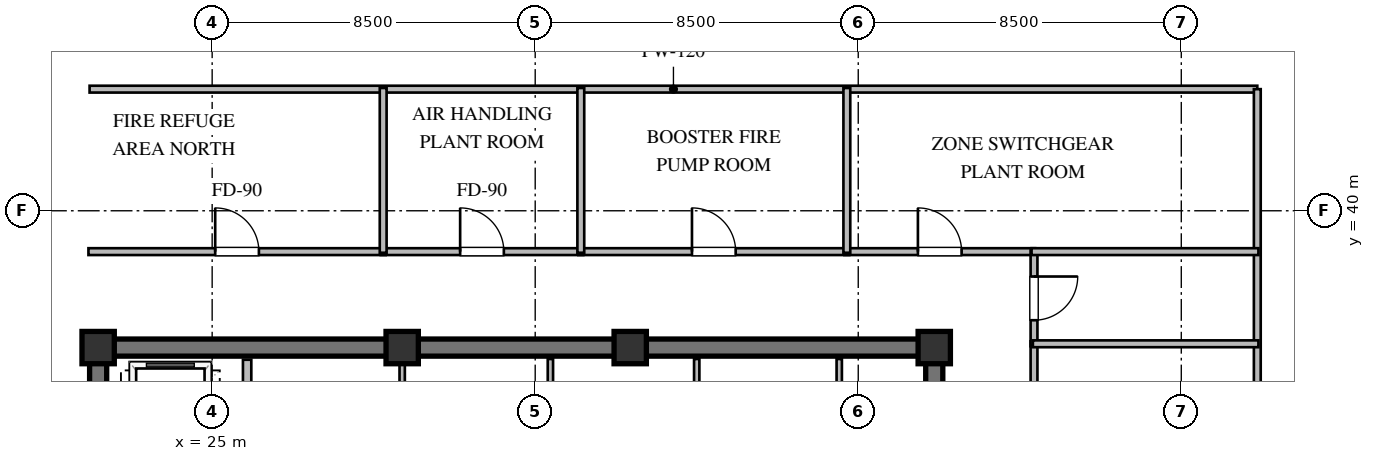
"""IFC4 building model, lengths in metres.
Left out: names, types, materials, properties, quantities, classifications, styles, units other than length and angle.
Written with IfcOpenShell. Run it as: python <this file> out.ifc"""

import sys

from ifc_helpers import new_model, si_unit, direction, frame, frame_2d, origin, origin_2d, place, context, subcontext, project, spatial, rectangle, extrude, element, fill, save


model = new_model("IFC4")
c1 = context("Model", 3, precision=1e-05, world=origin(), true_north=direction((0.0, 1.0)))
c2 = subcontext(c1, "Body", "Model", "MODEL_VIEW")
j1 = project(units=[si_unit("LENGTHUNIT", "METRE"), si_unit("PLANEANGLEUNIT", "RADIAN")], contexts=[c1])
p1 = place(None, origin())
s1 = spatial("IfcSite", under=j1, at=p1, CompositionType="ELEMENT")
p2 = place(p1, origin())
s2 = spatial("IfcBuilding", under=s1, at=p2, CompositionType="ELEMENT")
p3 = place(p2, frame((0.0, 0.0, 253.2)))
s3 = spatial("IfcBuildingStorey", under=s2, at=p3, CompositionType="ELEMENT", Elevation=253.2)
p4 = place(p3, frame((21.775, 36.4, 0.0), z_axis=(0.0, 0.0, 1.0), x_axis=(1.0, 0.0, 0.0)))
e1 = element("IfcWall", 1, at=p4, inside=s3, PredefinedType="SHEAR", context=c2, shape_type="SweptSolid", body=[
    extrude(rectangle(XDim=22.45, YDim=0.45, at=frame_2d((11.225, 0.0))), origin(), (0.0, 0.0, 1.0), 5.16),
])
p5 = place(p3, frame((22.0, 23.825, 0.0), z_axis=(0.0, 0.0, 1.0), x_axis=(0.0, 1.0, 0.0)))
e2 = element("IfcWall", 2, at=p5, inside=s3, PredefinedType="SHEAR", context=c2, shape_type="SweptSolid", body=[
    extrude(rectangle(XDim=12.35, YDim=0.45, at=frame_2d((6.175, 0.0))), origin(), (0.0, 0.0, 1.0), 5.16),
])
p6 = place(p3, frame((44.0, 23.825, 0.0), z_axis=(0.0, 0.0, 1.0), x_axis=(0.0, 1.0, 0.0)))
e3 = element("IfcWall", 3, at=p6, inside=s3, PredefinedType="SHEAR", context=c2, shape_type="SweptSolid", body=[
    extrude(rectangle(XDim=12.35, YDim=0.45, at=frame_2d((6.175, 0.0))), origin(), (0.0, 0.0, 1.0), 5.16),
])
p7 = place(p6, frame((8.675, 0.0, 0.0)))
e4 = element("IfcOpeningElement", 4, at=p7, cuts=e3, PredefinedType="OPENING", context=c2, shape_type="SweptSolid", body=[
    extrude(rectangle(XDim=1.5, YDim=2.15, at=frame_2d((0.75, 1.075))), frame((0.0, 0.235, 0.0), z_axis=(0.0, -1.0, 0.0), x_axis=(1.0, 0.0, 0.0)), (0.0, 0.0, 1.0), 0.47),
])
for number, where, z_axis, x_axis in (
    (5, (44.0, 36.4, 0.0), (0.0, 0.0, 1.0), (1.0, 0.0, 0.0)),
    (6, (36.0, 36.4, 0.0), (0.0, 0.0, 1.0), (1.0, 0.0, 0.0)),
    (7, (30.0, 36.4, 0.0), (0.0, 0.0, 1.0), (1.0, 0.0, 0.0)),
    (8, (22.0, 36.4, 0.0), (0.0, 0.0, 1.0), (1.0, 0.0, 0.0)),
):
    element("IfcColumn", number, at=place(p3, frame(where, z_axis=z_axis, x_axis=x_axis)), inside=s3, PredefinedType="COLUMN", context=c2, shape_type="SweptSolid", body=[
        extrude(rectangle(XDim=0.85, YDim=0.85, at=origin_2d()), origin(), (0.0, 0.0, 1.0), 5.4),
    ])
p8 = place(p3, frame((25.92, 33.35, 0.0), z_axis=(0.0, 0.0, 1.0), x_axis=(0.0, 1.0, 0.0)))
e9 = element("IfcWall", 9, at=p8, inside=s3, PredefinedType="SOLIDWALL", context=c2, shape_type="SweptSolid", body=[
    extrude(rectangle(XDim=2.73, YDim=0.22, at=frame_2d((1.365, 0.0))), origin(), (0.0, 0.0, 1.0), 5.16),
])
for number, where, z_axis, x_axis in (
    (10, (30.0, 33.35, 0.0), (0.0, 0.0, 1.0), (0.0, 1.0, 0.0)),
    (11, (33.9, 33.35, 0.0), (0.0, 0.0, 1.0), (0.0, 1.0, 0.0)),
    (12, (37.75, 33.35, 0.0), (0.0, 0.0, 1.0), (0.0, 1.0, 0.0)),
    (13, (41.5, 33.35, 0.0), (0.0, 0.0, 1.0), (0.0, 1.0, 0.0)),
):
    element("IfcWall", number, at=place(p3, frame(where, z_axis=z_axis, x_axis=x_axis)), inside=s3, PredefinedType="PARTITIONING", context=c2, shape_type="SweptSolid", body=[
        extrude(rectangle(XDim=2.75, YDim=0.14, at=frame_2d((1.375, 0.0))), origin(), (0.0, 0.0, 1.0), 5.16),
    ])
p9 = place(p3, frame((21.775, 43.2, 0.0), z_axis=(0.0, 0.0, 1.0), x_axis=(1.0, 0.0, 0.0)))
e14 = element("IfcWall", 14, at=p9, inside=s3, PredefinedType="PARTITIONING", context=c2, shape_type="SweptSolid", body=[
    extrude(rectangle(XDim=30.725, YDim=0.18, at=frame_2d((15.363, 0.0))), origin(), (0.0, 0.0, 1.0), 5.16),
])
p10 = place(p3, frame((52.5, 23.4, 0.0), z_axis=(0.0, 0.0, 1.0), x_axis=(0.0, 1.0, 0.0)))
e15 = element("IfcWall", 15, at=p10, inside=s3, PredefinedType="PARTITIONING", context=c2, shape_type="SweptSolid", body=[
    extrude(rectangle(XDim=19.8, YDim=0.18, at=frame_2d((9.9, 0.0))), origin(), (0.0, 0.0, 1.0), 5.16),
])
p11 = place(p3, frame((21.745, 38.925, 0.0), z_axis=(0.0, 0.0, 1.0), x_axis=(1.0, 0.0, 0.0)))
e16 = element("IfcWall", 16, at=p11, inside=s3, PredefinedType="PARTITIONING", context=c2, shape_type="SweptSolid", body=[
    extrude(rectangle(XDim=7.82, YDim=0.18, at=frame_2d((3.91, 0.0))), origin(), (0.0, 0.0, 1.0), 5.16),
])
p12 = place(p11, frame((3.335, 0.0, 0.0)))
e17 = element("IfcOpeningElement", 17, at=p12, cuts=e16, PredefinedType="OPENING", context=c2, shape_type="SweptSolid", body=[
    extrude(rectangle(XDim=1.15, YDim=2.1, at=frame_2d((0.575, 1.05))), frame((0.0, 0.1, 0.0), z_axis=(0.0, -1.0, 0.0), x_axis=(1.0, 0.0, 0.0)), (0.0, 0.0, 1.0), 0.2),
])
p13 = place(p3, frame((46.625, 36.565, 0.0), z_axis=(0.0, 0.0, 1.0), x_axis=(0.0, -1.0, 0.0)))
e18 = element("IfcWall", 18, at=p13, inside=s3, PredefinedType="PARTITIONING", context=c2, shape_type="SweptSolid", body=[
    extrude(rectangle(XDim=13.195, YDim=0.18, at=frame_2d((6.597, 0.0))), origin(), (0.0, 0.0, 1.0), 5.16),
])
p14 = place(p13, frame((6.022, 0.0, 0.0)))
e19 = element("IfcOpeningElement", 19, at=p14, cuts=e18, PredefinedType="OPENING", context=c2, shape_type="SweptSolid", body=[
    extrude(rectangle(XDim=1.15, YDim=2.1, at=frame_2d((0.575, 1.05))), frame((0.0, 0.1, 0.0), z_axis=(0.0, -1.0, 0.0), x_axis=(1.0, 0.0, 0.0)), (0.0, 0.0, 1.0), 0.2),
])
p15 = place(p3, frame((29.435, 38.925, 0.0), z_axis=(0.0, 0.0, 1.0), x_axis=(1.0, 0.0, 0.0)))
e20 = element("IfcWall", 20, at=p15, inside=s3, PredefinedType="PARTITIONING", context=c2, shape_type="SweptSolid", body=[
    extrude(rectangle(XDim=5.33, YDim=0.18, at=frame_2d((2.665, 0.0))), origin(), (0.0, 0.0, 1.0), 5.16),
])
p16 = place(p15, frame((2.09, 0.0, 0.0)))
e21 = element("IfcOpeningElement", 21, at=p16, cuts=e20, PredefinedType="OPENING", context=c2, shape_type="SweptSolid", body=[
    extrude(rectangle(XDim=1.15, YDim=2.1, at=frame_2d((0.575, 1.05))), frame((0.0, 0.1, 0.0), z_axis=(0.0, -1.0, 0.0), x_axis=(1.0, 0.0, 0.0)), (0.0, 0.0, 1.0), 0.2),
])
p17 = place(p3, frame((34.635, 38.925, 0.0), z_axis=(0.0, 0.0, 1.0), x_axis=(1.0, 0.0, 0.0)))
e22 = element("IfcWall", 22, at=p17, inside=s3, PredefinedType="PARTITIONING", context=c2, shape_type="SweptSolid", body=[
    extrude(rectangle(XDim=7.13, YDim=0.18, at=frame_2d((3.565, 0.0))), origin(), (0.0, 0.0, 1.0), 5.16),
])
p18 = place(p17, frame((2.99, 0.0, 0.0)))
e23 = element("IfcOpeningElement", 23, at=p18, cuts=e22, PredefinedType="OPENING", context=c2, shape_type="SweptSolid", body=[
    extrude(rectangle(XDim=1.15, YDim=2.1, at=frame_2d((0.575, 1.05))), frame((0.0, 0.1, 0.0), z_axis=(0.0, -1.0, 0.0), x_axis=(1.0, 0.0, 0.0)), (0.0, 0.0, 1.0), 0.2),
])
p19 = place(p3, frame((41.635, 38.925, 0.0), z_axis=(0.0, 0.0, 1.0), x_axis=(1.0, 0.0, 0.0)))
e24 = element("IfcWall", 24, at=p19, inside=s3, PredefinedType="PARTITIONING", context=c2, shape_type="SweptSolid", body=[
    extrude(rectangle(XDim=5.02, YDim=0.18, at=frame_2d((2.51, 0.0))), origin(), (0.0, 0.0, 1.0), 5.16),
])
p20 = place(p19, frame((1.935, 0.0, 0.0)))
e25 = element("IfcOpeningElement", 25, at=p20, cuts=e24, PredefinedType="OPENING", context=c2, shape_type="SweptSolid", body=[
    extrude(rectangle(XDim=1.15, YDim=2.1, at=frame_2d((0.575, 1.05))), frame((0.0, 0.1, 0.0), z_axis=(0.0, -1.0, 0.0), x_axis=(1.0, 0.0, 0.0)), (0.0, 0.0, 1.0), 0.2),
])
p21 = place(p3, frame((46.625, 38.955, 0.0), z_axis=(0.0, 0.0, 1.0), x_axis=(0.0, -1.0, 0.0)))
e26 = element("IfcWall", 26, at=p21, inside=s3, PredefinedType="PARTITIONING", context=c2, shape_type="SweptSolid", body=[
    extrude(rectangle(XDim=2.52, YDim=0.18, at=frame_2d((1.26, 0.0))), origin(), (0.0, 0.0, 1.0), 5.16),
])
p22 = place(p21, frame((0.685, 0.0, 0.0)))
e27 = element("IfcOpeningElement", 27, at=p22, cuts=e26, PredefinedType="OPENING", context=c2, shape_type="SweptSolid", body=[
    extrude(rectangle(XDim=1.15, YDim=2.1, at=frame_2d((0.575, 1.05))), frame((0.0, 0.1, 0.0), z_axis=(0.0, -1.0, 0.0), x_axis=(1.0, 0.0, 0.0)), (0.0, 0.0, 1.0), 0.2),
])
p23 = place(p3, frame((29.5, 43.23, 0.0), z_axis=(0.0, 0.0, 1.0), x_axis=(0.0, -1.0, 0.0)))
e28 = element("IfcWall", 28, at=p23, inside=s3, PredefinedType="PARTITIONING", context=c2, shape_type="SweptSolid", body=[
    extrude(rectangle(XDim=4.335, YDim=0.18, at=frame_2d((2.167, 0.0))), origin(), (0.0, 0.0, 1.0), 5.16),
])
p24 = place(p3, frame((46.595, 36.5, 0.0), z_axis=(0.0, 0.0, 1.0), x_axis=(1.0, 0.0, 0.0)))
e29 = element("IfcWall", 29, at=p24, inside=s3, PredefinedType="PARTITIONING", context=c2, shape_type="SweptSolid", body=[
    extrude(rectangle(XDim=5.935, YDim=0.18, at=frame_2d((2.968, 0.0))), origin(), (0.0, 0.0, 1.0), 3.65),
])
for number, where, z_axis, x_axis in (
    (30, (34.7, 43.23, 0.0), (0.0, 0.0, 1.0), (0.0, -1.0, 0.0)),
    (31, (41.7, 43.23, 0.0), (0.0, 0.0, 1.0), (0.0, -1.0, 0.0)),
):
    element("IfcWall", number, at=place(p3, frame(where, z_axis=z_axis, x_axis=x_axis)), inside=s3, PredefinedType="PARTITIONING", context=c2, shape_type="SweptSolid", body=[
        extrude(rectangle(XDim=4.335, YDim=0.18, at=frame_2d((2.167, 0.0))), origin(), (0.0, 0.0, 1.0), 5.16),
    ])
p25 = place(p3, frame((52.53, 38.925, 0.0), z_axis=(0.0, 0.0, 1.0), x_axis=(-1.0, 0.0, 0.0)))
e32 = element("IfcWall", 32, at=p25, inside=s3, PredefinedType="PARTITIONING", context=c2, shape_type="SweptSolid", body=[
    extrude(rectangle(XDim=5.97, YDim=0.18, at=frame_2d((2.985, 0.0))), origin(), (0.0, 0.0, 1.0), 5.16),
])
p26 = place(p12, origin())
e33 = element("IfcDoor", 33, at=p26, inside=s3, OperationType="SINGLE_SWING_LEFT", PredefinedType="DOOR", context=c2, shape_type="SweptSolid", body=[
    extrude(rectangle(XDim=1.15, YDim=2.1, at=frame_2d((0.575, 1.05))), frame((0.0, 0.025, 0.0), z_axis=(0.0, -1.0, 0.0), x_axis=(1.0, 0.0, 0.0)), (0.0, 0.0, 1.0), 0.05),
])
fill(e17, e33)
p27 = place(p16, origin())
e34 = element("IfcDoor", 34, at=p27, inside=s3, OperationType="SINGLE_SWING_LEFT", PredefinedType="DOOR", context=c2, shape_type="SweptSolid", body=[
    extrude(rectangle(XDim=1.15, YDim=2.1, at=frame_2d((0.575, 1.05))), frame((0.0, 0.025, 0.0), z_axis=(0.0, -1.0, 0.0), x_axis=(1.0, 0.0, 0.0)), (0.0, 0.0, 1.0), 0.05),
])
fill(e21, e34)
p28 = place(p18, origin())
e35 = element("IfcDoor", 35, at=p28, inside=s3, OperationType="SINGLE_SWING_LEFT", PredefinedType="DOOR", context=c2, shape_type="SweptSolid", body=[
    extrude(rectangle(XDim=1.15, YDim=2.1, at=frame_2d((0.575, 1.05))), frame((0.0, 0.025, 0.0), z_axis=(0.0, -1.0, 0.0), x_axis=(1.0, 0.0, 0.0)), (0.0, 0.0, 1.0), 0.05),
])
fill(e23, e35)
p29 = place(p20, origin())
e36 = element("IfcDoor", 36, at=p29, inside=s3, OperationType="SINGLE_SWING_LEFT", PredefinedType="DOOR", context=c2, shape_type="SweptSolid", body=[
    extrude(rectangle(XDim=1.15, YDim=2.1, at=frame_2d((0.575, 1.05))), frame((0.0, 0.025, 0.0), z_axis=(0.0, -1.0, 0.0), x_axis=(1.0, 0.0, 0.0)), (0.0, 0.0, 1.0), 0.05),
])
fill(e25, e36)
p30 = place(p22, origin())
e37 = element("IfcDoor", 37, at=p30, inside=s3, OperationType="SINGLE_SWING_LEFT", PredefinedType="DOOR", context=c2, shape_type="SweptSolid", body=[
    extrude(rectangle(XDim=1.15, YDim=2.1, at=frame_2d((0.575, 1.05))), frame((0.0, 0.025, 0.0), z_axis=(0.0, -1.0, 0.0), x_axis=(1.0, 0.0, 0.0)), (0.0, 0.0, 1.0), 0.05),
])
fill(e27, e37)
save(model, sys.argv[1])
